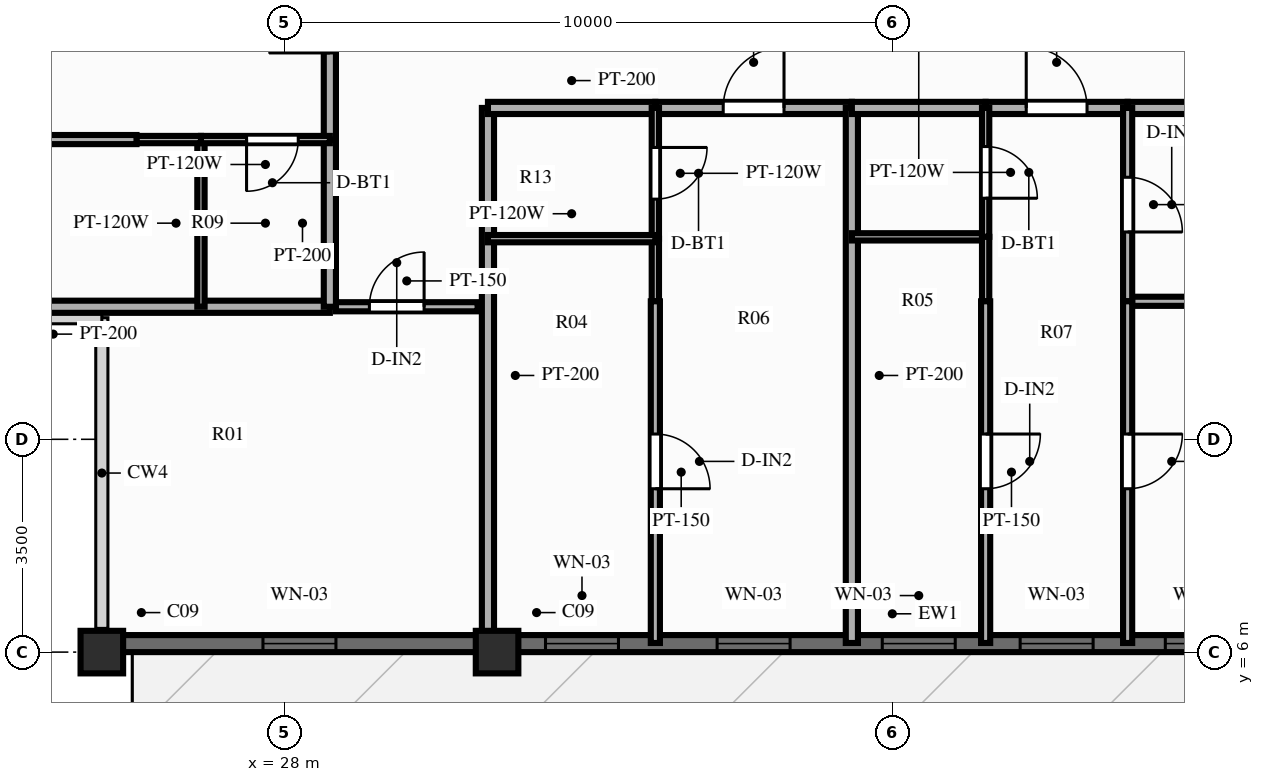
"""IFC4 building model, lengths in metres.
Left out: names, types, materials, properties, quantities, classifications, styles, units other than length and angle.
Written with IfcOpenShell. Run it as: python <this file> out.ifc"""

import sys

from ifc_helpers import new_model, si_unit, direction, frame, frame_2d, origin, origin_2d, place, context, subcontext, project, spatial, rectangle, extrude, source, transform, mapped, element, fill, save


model = new_model("IFC4")
c1 = context("Model", 3, precision=1e-05, world=origin(), true_north=direction((0.0, 1.0)))
c2 = subcontext(c1, "Body", "Model", "MODEL_VIEW")
j1 = project(units=[si_unit("LENGTHUNIT", "METRE"), si_unit("PLANEANGLEUNIT", "RADIAN")], contexts=[c1])
p1 = place(None, origin())
s1 = spatial("IfcSite", under=j1, at=p1, CompositionType="ELEMENT")
p2 = place(p1, origin())
s2 = spatial("IfcBuilding", under=s1, at=p2, CompositionType="ELEMENT")
p3 = place(p2, frame((0.0, 0.0, 216.3)))
s3 = spatial("IfcBuildingStorey", under=s2, at=p3, CompositionType="ELEMENT", Elevation=216.3)
m1 = source(origin(), c2, "Body", "SweptSolid", [
    extrude(rectangle(XDim=0.7, YDim=0.7, at=origin_2d()), origin(), (0.0, 0.0, 1.0), 3.9),
])
for number, where, z_axis, x_axis in (
    (1, (25.0, 6.0, 0.0), (0.0, 0.0, 1.0), (1.0, 0.0, 0.0)),
    (2, (31.5, 6.0, 0.0), (0.0, 0.0, 1.0), (1.0, 0.0, 0.0)),
):
    element("IfcColumn", number, at=place(p3, frame(where, z_axis=z_axis, x_axis=x_axis)), inside=s3, PredefinedType="COLUMN", context=c2, shape_type="MappedRepresentation", body=[
        mapped(m1, transform((0.0, 0.0, 0.0), scale=1.0)),
    ])
p4 = place(p3, frame((25.0, 6.14, 0.0), z_axis=(0.0, 0.0, 1.0), x_axis=(1.0, 0.0, 0.0)))
e3 = element("IfcWall", 3, at=p4, inside=s3, PredefinedType="SOLIDWALL", context=c2, shape_type="SweptSolid", body=[
    extrude(rectangle(XDim=26.0, YDim=0.28, at=frame_2d((13.0, 0.0))), origin(), (0.0, 0.0, 1.0), 2.44),
])
p5 = place(p4, frame((2.65, 0.0, 0.25)))
e4 = element("IfcOpeningElement", 4, at=p5, cuts=e3, PredefinedType="OPENING", context=c2, shape_type="SweptSolid", body=[
    extrude(rectangle(XDim=1.2, YDim=1.5, at=frame_2d((0.6, 0.75))), frame((0.0, 0.152, 0.0), z_axis=(0.0, -1.0, 0.0), x_axis=(1.0, 0.0, 0.0)), (0.0, 0.0, 1.0), 0.304),
])
p6 = place(p4, frame((7.296, 0.0, 0.25)))
e5 = element("IfcOpeningElement", 5, at=p6, cuts=e3, PredefinedType="OPENING", context=c2, shape_type="SweptSolid", body=[
    extrude(rectangle(XDim=1.2, YDim=1.5, at=frame_2d((0.6, 0.75))), frame((0.0, 0.152, 0.0), z_axis=(0.0, -1.0, 0.0), x_axis=(1.0, 0.0, 0.0)), (0.0, 0.0, 1.0), 0.304),
])
p7 = place(p4, frame((10.119, 0.0, 0.25)))
e6 = element("IfcOpeningElement", 6, at=p7, cuts=e3, PredefinedType="OPENING", context=c2, shape_type="SweptSolid", body=[
    extrude(rectangle(XDim=1.2, YDim=1.5, at=frame_2d((0.6, 0.75))), frame((0.0, 0.152, 0.0), z_axis=(0.0, -1.0, 0.0), x_axis=(1.0, 0.0, 0.0)), (0.0, 0.0, 1.0), 0.304),
])
p8 = place(p4, frame((12.835, 0.0, 0.25)))
e7 = element("IfcOpeningElement", 7, at=p8, cuts=e3, PredefinedType="OPENING", context=c2, shape_type="SweptSolid", body=[
    extrude(rectangle(XDim=1.2, YDim=1.5, at=frame_2d((0.6, 0.75))), frame((0.0, 0.152, 0.0), z_axis=(0.0, -1.0, 0.0), x_axis=(1.0, 0.0, 0.0)), (0.0, 0.0, 1.0), 0.304),
])
p9 = place(p4, frame((15.103, 0.0, 0.25)))
e8 = element("IfcOpeningElement", 8, at=p9, cuts=e3, PredefinedType="OPENING", context=c2, shape_type="SweptSolid", body=[
    extrude(rectangle(XDim=1.2, YDim=1.5, at=frame_2d((0.6, 0.75))), frame((0.0, 0.152, 0.0), z_axis=(0.0, -1.0, 0.0), x_axis=(1.0, 0.0, 0.0)), (0.0, 0.0, 1.0), 0.304),
])
p10 = place(p4, frame((17.49, 0.0, 0.25)))
e9 = element("IfcOpeningElement", 9, at=p10, cuts=e3, PredefinedType="OPENING", context=c2, shape_type="SweptSolid", body=[
    extrude(rectangle(XDim=1.2, YDim=1.5, at=frame_2d((0.6, 0.75))), frame((0.0, 0.152, 0.0), z_axis=(0.0, -1.0, 0.0), x_axis=(1.0, 0.0, 0.0)), (0.0, 0.0, 1.0), 0.304),
])
p11 = place(p4, frame((23.3, 0.0, 0.0), z_axis=(0.0, 0.0, 1.0), x_axis=(-1.0, 0.0, 0.0)))
e10 = element("IfcOpeningElement", 10, at=p11, cuts=e3, PredefinedType="OPENING", context=c2, shape_type="SweptSolid", body=[
    extrude(rectangle(XDim=1.1, YDim=2.15, at=frame_2d((0.55, 1.075))), frame((0.0, 0.152, 0.0), z_axis=(0.0, -1.0, 0.0), x_axis=(1.0, 0.0, 0.0)), (0.0, 0.0, 1.0), 0.304),
])
p12 = place(p3, frame((28.85, 11.68, 0.0), z_axis=(0.0, 0.0, 1.0), x_axis=(1.0, 0.0, 0.0)))
e11 = element("IfcWall", 11, at=p12, inside=s3, PredefinedType="PARTITIONING", context=c2, shape_type="SweptSolid", body=[
    extrude(rectangle(XDim=2.33, YDim=0.15, at=frame_2d((1.165, 0.0))), origin(), (0.0, 0.0, 1.0), 2.24),
])
p13 = place(p12, frame((0.55, 0.0, 0.0)))
e12 = element("IfcOpeningElement", 12, at=p13, cuts=e11, PredefinedType="OPENING", context=c2, shape_type="SweptSolid", body=[
    extrude(rectangle(XDim=0.9, YDim=2.1, at=frame_2d((0.45, 1.05))), frame((0.0, 0.087, 0.0), z_axis=(0.0, -1.0, 0.0), x_axis=(1.0, 0.0, 0.0)), (0.0, 0.0, 1.0), 0.174),
])
p14 = place(p3, frame((31.35, 14.95, 0.0), z_axis=(0.0, 0.0, 1.0), x_axis=(0.0, -1.0, 0.0)))
e13 = element("IfcWall", 13, at=p14, inside=s3, PredefinedType="PARTITIONING", context=c2, shape_type="SweptSolid", body=[
    extrude(rectangle(XDim=8.8, YDim=0.2, at=frame_2d((4.4, 0.0))), origin(), (0.0, 0.0, 1.0), 2.44),
])
p15 = place(p3, frame((31.35, 14.95, 0.0), z_axis=(0.0, 0.0, 1.0), x_axis=(1.0, 0.0, 0.0)))
e14 = element("IfcWall", 14, at=p15, inside=s3, PredefinedType="PARTITIONING", context=c2, shape_type="SweptSolid", body=[
    extrude(rectangle(XDim=2.753, YDim=0.2, at=frame_2d((1.376, 0.0))), origin(), (0.0, 0.0, 1.0), 3.56),
])
p16 = place(p3, frame((34.103, 14.95, 0.0), z_axis=(0.0, 0.0, 1.0), x_axis=(1.0, 0.0, 0.0)))
e15 = element("IfcWall", 15, at=p16, inside=s3, PredefinedType="PARTITIONING", context=c2, shape_type="SweptSolid", body=[
    extrude(rectangle(XDim=3.232, YDim=0.2, at=frame_2d((1.616, 0.0))), origin(), (0.0, 0.0, 1.0), 3.56),
])
p17 = place(p16, frame((1.116, 0.0, 0.0)))
e16 = element("IfcOpeningElement", 16, at=p17, cuts=e15, PredefinedType="OPENING", context=c2, shape_type="SweptSolid", body=[
    extrude(rectangle(XDim=1.0, YDim=2.15, at=frame_2d((0.5, 1.075))), frame((0.0, 0.112, 0.0), z_axis=(0.0, -1.0, 0.0), x_axis=(1.0, 0.0, 0.0)), (0.0, 0.0, 1.0), 0.224),
])
p18 = place(p3, frame((34.103, 14.95, 0.0), z_axis=(0.0, 0.0, 1.0), x_axis=(0.0, -1.0, 0.0)))
e17 = element("IfcWall", 17, at=p18, inside=s3, PredefinedType="PARTITIONING", context=c2, shape_type="SweptSolid", body=[
    extrude(rectangle(XDim=2.15, YDim=0.12, at=frame_2d((1.075, 0.0))), origin(), (0.0, 0.0, 1.0), 3.56),
])
p19 = place(p18, frame((0.65, 0.0, 0.0)))
e18 = element("IfcOpeningElement", 18, at=p19, cuts=e17, PredefinedType="OPENING", context=c2, shape_type="SweptSolid", body=[
    extrude(rectangle(XDim=0.85, YDim=2.05, at=frame_2d((0.425, 1.025))), frame((0.0, 0.072, 0.0), z_axis=(0.0, -1.0, 0.0), x_axis=(1.0, 0.0, 0.0)), (0.0, 0.0, 1.0), 0.144),
])
p20 = place(p3, frame((34.103, 12.8, 0.0), z_axis=(0.0, 0.0, 1.0), x_axis=(0.0, -1.0, 0.0)))
e19 = element("IfcWall", 19, at=p20, inside=s3, PredefinedType="PARTITIONING", context=c2, shape_type="SweptSolid", body=[
    extrude(rectangle(XDim=1.03, YDim=0.12, at=frame_2d((0.515, 0.0))), origin(), (0.0, 0.0, 1.0), 3.56),
])
p21 = place(p3, frame((31.35, 12.8, 0.0), z_axis=(0.0, 0.0, 1.0), x_axis=(1.0, 0.0, 0.0)))
e20 = element("IfcWall", 20, at=p21, inside=s3, PredefinedType="PARTITIONING", context=c2, shape_type="SweptSolid", body=[
    extrude(rectangle(XDim=2.753, YDim=0.12, at=frame_2d((1.376, 0.0))), origin(), (0.0, 0.0, 1.0), 3.56),
])
p22 = place(p3, frame((34.103, 11.77, 0.0), z_axis=(0.0, 0.0, 1.0), x_axis=(0.0, -1.0, 0.0)))
e21 = element("IfcWall", 21, at=p22, inside=s3, PredefinedType="PARTITIONING", context=c2, shape_type="SweptSolid", body=[
    extrude(rectangle(XDim=5.62, YDim=0.15, at=frame_2d((2.81, 0.0))), origin(), (0.0, 0.0, 1.0), 3.56),
])
p23 = place(p22, frame((2.183, 0.0, 0.0)))
e22 = element("IfcOpeningElement", 22, at=p23, cuts=e21, PredefinedType="OPENING", context=c2, shape_type="SweptSolid", body=[
    extrude(rectangle(XDim=0.9, YDim=2.1, at=frame_2d((0.45, 1.05))), frame((0.0, 0.087, 0.0), z_axis=(0.0, -1.0, 0.0), x_axis=(1.0, 0.0, 0.0)), (0.0, 0.0, 1.0), 0.174),
])
p24 = place(p3, frame((37.335, 14.95, 0.0), z_axis=(0.0, 0.0, 1.0), x_axis=(0.0, -1.0, 0.0)))
e23 = element("IfcWall", 23, at=p24, inside=s3, PredefinedType="PARTITIONING", context=c2, shape_type="SweptSolid", body=[
    extrude(rectangle(XDim=8.8, YDim=0.2, at=frame_2d((4.4, 0.0))), origin(), (0.0, 0.0, 1.0), 3.56),
])
p25 = place(p3, frame((37.335, 14.95, 0.0), z_axis=(0.0, 0.0, 1.0), x_axis=(1.0, 0.0, 0.0)))
e24 = element("IfcWall", 24, at=p25, inside=s3, PredefinedType="PARTITIONING", context=c2, shape_type="SweptSolid", body=[
    extrude(rectangle(XDim=2.2, YDim=0.2, at=frame_2d((1.1, 0.0))), origin(), (0.0, 0.0, 1.0), 3.56),
])
p26 = place(p3, frame((39.535, 14.95, 0.0), z_axis=(0.0, 0.0, 1.0), x_axis=(1.0, 0.0, 0.0)))
e25 = element("IfcWall", 25, at=p26, inside=s3, PredefinedType="PARTITIONING", context=c2, shape_type="SweptSolid", body=[
    extrude(rectangle(XDim=2.335, YDim=0.2, at=frame_2d((1.168, 0.0))), origin(), (0.0, 0.0, 1.0), 3.56),
])
p27 = place(p26, frame((0.668, 0.0, 0.0)))
e26 = element("IfcOpeningElement", 26, at=p27, cuts=e25, PredefinedType="OPENING", context=c2, shape_type="SweptSolid", body=[
    extrude(rectangle(XDim=1.0, YDim=2.15, at=frame_2d((0.5, 1.075))), frame((0.0, 0.112, 0.0), z_axis=(0.0, -1.0, 0.0), x_axis=(1.0, 0.0, 0.0)), (0.0, 0.0, 1.0), 0.224),
])
p28 = place(p3, frame((41.87, 14.95, 0.0), z_axis=(0.0, 0.0, 1.0), x_axis=(1.0, 0.0, 0.0)))
e27 = element("IfcWall", 27, at=p28, inside=s3, PredefinedType="PARTITIONING", context=c2, shape_type="SweptSolid", body=[
    extrude(rectangle(XDim=2.78, YDim=0.2, at=frame_2d((1.39, 0.0))), origin(), (0.0, 0.0, 1.0), 3.56),
])
p29 = place(p3, frame((37.335, 12.83, 0.0), z_axis=(0.0, 0.0, 1.0), x_axis=(1.0, 0.0, 0.0)))
e28 = element("IfcWall", 28, at=p29, inside=s3, PredefinedType="PARTITIONING", context=c2, shape_type="SweptSolid", body=[
    extrude(rectangle(XDim=2.2, YDim=0.12, at=frame_2d((1.1, 0.0))), origin(), (0.0, 0.0, 1.0), 3.56),
])
p30 = place(p3, frame((41.87, 11.77, 0.0), z_axis=(0.0, 0.0, 1.0), x_axis=(1.0, 0.0, 0.0)))
e29 = element("IfcWall", 29, at=p30, inside=s3, PredefinedType="PARTITIONING", context=c2, shape_type="SweptSolid", body=[
    extrude(rectangle(XDim=2.78, YDim=0.15, at=frame_2d((1.39, 0.0))), origin(), (0.0, 0.0, 1.0), 3.39),
])
p31 = place(p3, frame((39.535, 14.95, 0.0), z_axis=(0.0, 0.0, 1.0), x_axis=(0.0, -1.0, 0.0)))
e30 = element("IfcWall", 30, at=p31, inside=s3, PredefinedType="PARTITIONING", context=c2, shape_type="SweptSolid", body=[
    extrude(rectangle(XDim=2.12, YDim=0.12, at=frame_2d((1.06, 0.0))), origin(), (0.0, 0.0, 1.0), 3.56),
])
p32 = place(p31, frame((0.635, 0.0, 0.0)))
e31 = element("IfcOpeningElement", 31, at=p32, cuts=e30, PredefinedType="OPENING", context=c2, shape_type="SweptSolid", body=[
    extrude(rectangle(XDim=0.85, YDim=2.05, at=frame_2d((0.425, 1.025))), frame((0.0, 0.072, 0.0), z_axis=(0.0, -1.0, 0.0), x_axis=(1.0, 0.0, 0.0)), (0.0, 0.0, 1.0), 0.144),
])
p33 = place(p3, frame((39.535, 12.83, 0.0), z_axis=(0.0, 0.0, 1.0), x_axis=(0.0, -1.0, 0.0)))
e32 = element("IfcWall", 32, at=p33, inside=s3, PredefinedType="PARTITIONING", context=c2, shape_type="SweptSolid", body=[
    extrude(rectangle(XDim=1.06, YDim=0.12, at=frame_2d((0.53, 0.0))), origin(), (0.0, 0.0, 1.0), 3.56),
])
p34 = place(p3, frame((39.535, 11.77, 0.0), z_axis=(0.0, 0.0, 1.0), x_axis=(0.0, -1.0, 0.0)))
e33 = element("IfcWall", 33, at=p34, inside=s3, PredefinedType="PARTITIONING", context=c2, shape_type="SweptSolid", body=[
    extrude(rectangle(XDim=5.62, YDim=0.15, at=frame_2d((2.81, 0.0))), origin(), (0.0, 0.0, 1.0), 3.56),
])
p35 = place(p34, frame((2.183, 0.0, 0.0)))
e34 = element("IfcOpeningElement", 34, at=p35, cuts=e33, PredefinedType="OPENING", context=c2, shape_type="SweptSolid", body=[
    extrude(rectangle(XDim=0.9, YDim=2.1, at=frame_2d((0.45, 1.05))), frame((0.0, 0.087, 0.0), z_axis=(0.0, -1.0, 0.0), x_axis=(1.0, 0.0, 0.0)), (0.0, 0.0, 1.0), 0.174),
])
p36 = place(p3, frame((41.87, 14.95, 0.0), z_axis=(0.0, 0.0, 1.0), x_axis=(0.0, -1.0, 0.0)))
e35 = element("IfcWall", 35, at=p36, inside=s3, PredefinedType="PARTITIONING", context=c2, shape_type="SweptSolid", body=[
    extrude(rectangle(XDim=3.18, YDim=0.15, at=frame_2d((1.59, 0.0))), origin(), (0.0, 0.0, 1.0), 3.56),
])
p37 = place(p36, frame((1.14, 0.0, 0.0)))
e36 = element("IfcOpeningElement", 36, at=p37, cuts=e35, PredefinedType="OPENING", context=c2, shape_type="SweptSolid", body=[
    extrude(rectangle(XDim=0.9, YDim=2.1, at=frame_2d((0.45, 1.05))), frame((0.0, 0.087, 0.0), z_axis=(0.0, -1.0, 0.0), x_axis=(1.0, 0.0, 0.0)), (0.0, 0.0, 1.0), 0.174),
])
p38 = place(p3, frame((41.87, 11.77, 0.0), z_axis=(0.0, 0.0, 1.0), x_axis=(0.0, -1.0, 0.0)))
e37 = element("IfcWall", 37, at=p38, inside=s3, PredefinedType="PARTITIONING", context=c2, shape_type="SweptSolid", body=[
    extrude(rectangle(XDim=5.62, YDim=0.15, at=frame_2d((2.81, 0.0))), origin(), (0.0, 0.0, 1.0), 3.56),
])
p39 = place(p38, frame((2.183, 0.0, 0.0)))
e38 = element("IfcOpeningElement", 38, at=p39, cuts=e37, PredefinedType="OPENING", context=c2, shape_type="SweptSolid", body=[
    extrude(rectangle(XDim=0.9, YDim=2.1, at=frame_2d((0.45, 1.05))), frame((0.0, 0.087, 0.0), z_axis=(0.0, -1.0, 0.0), x_axis=(1.0, 0.0, 0.0)), (0.0, 0.0, 1.0), 0.174),
])
p40 = place(p3, frame((28.75, 11.68, 0.0), z_axis=(0.0, 0.0, 1.0), x_axis=(-1.0, 0.0, 0.0)))
e39 = element("IfcWall", 39, at=p40, inside=s3, PredefinedType="PARTITIONING", context=c2, shape_type="SweptSolid", body=[
    extrude(rectangle(XDim=9.1, YDim=0.2, at=frame_2d((4.55, 0.0))), origin(), (0.0, 0.0, 1.0), 2.24),
])
p41 = place(p3, frame((28.75, 11.68, 0.0), z_axis=(0.0, 0.0, 1.0), x_axis=(0.0, 1.0, 0.0)))
e40 = element("IfcWall", 40, at=p41, inside=s3, PredefinedType="PARTITIONING", context=c2, shape_type="SweptSolid", body=[
    extrude(rectangle(XDim=2.75, YDim=0.2, at=frame_2d((1.375, 0.0))), origin(), (0.0, 0.0, 1.0), 3.56),
])
p42 = place(p3, frame((28.75, 14.43, 0.0), z_axis=(0.0, 0.0, 1.0), x_axis=(0.0, 1.0, 0.0)))
e41 = element("IfcWall", 41, at=p42, inside=s3, PredefinedType="PARTITIONING", context=c2, shape_type="SweptSolid", body=[
    extrude(rectangle(XDim=3.85, YDim=0.2, at=frame_2d((1.925, 0.0))), origin(), (0.0, 0.0, 1.0), 3.56),
])
p43 = place(p42, frame((1.425, 0.0, 0.0)))
e42 = element("IfcOpeningElement", 42, at=p43, cuts=e41, PredefinedType="OPENING", context=c2, shape_type="SweptSolid", body=[
    extrude(rectangle(XDim=1.0, YDim=2.15, at=frame_2d((0.5, 1.075))), frame((0.0, 0.112, 0.0), z_axis=(0.0, -1.0, 0.0), x_axis=(1.0, 0.0, 0.0)), (0.0, 0.0, 1.0), 0.224),
])
p44 = place(p3, frame((26.63, 11.68, 0.0), z_axis=(0.0, 0.0, 1.0), x_axis=(0.0, 1.0, 0.0)))
e43 = element("IfcWall", 43, at=p44, inside=s3, PredefinedType="PARTITIONING", context=c2, shape_type="SweptSolid", body=[
    extrude(rectangle(XDim=2.75, YDim=0.12, at=frame_2d((1.375, 0.0))), origin(), (0.0, 0.0, 1.0), 2.24),
])
p45 = place(p3, frame((28.75, 14.43, 0.0), z_axis=(0.0, 0.0, 1.0), x_axis=(-1.0, 0.0, 0.0)))
e44 = element("IfcWall", 44, at=p45, inside=s3, PredefinedType="PARTITIONING", context=c2, shape_type="SweptSolid", body=[
    extrude(rectangle(XDim=2.12, YDim=0.12, at=frame_2d((1.06, 0.0))), origin(), (0.0, 0.0, 1.0), 3.56),
])
p46 = place(p45, frame((0.52, 0.0, 0.0)))
e45 = element("IfcOpeningElement", 45, at=p46, cuts=e44, PredefinedType="OPENING", context=c2, shape_type="SweptSolid", body=[
    extrude(rectangle(XDim=0.85, YDim=2.05, at=frame_2d((0.425, 1.025))), frame((0.0, 0.072, 0.0), z_axis=(0.0, -1.0, 0.0), x_axis=(1.0, 0.0, 0.0)), (0.0, 0.0, 1.0), 0.144),
])
p47 = place(p3, frame((26.63, 14.43, 0.0), z_axis=(0.0, 0.0, 1.0), x_axis=(-1.0, 0.0, 0.0)))
e46 = element("IfcWall", 46, at=p47, inside=s3, PredefinedType="PARTITIONING", context=c2, shape_type="SweptSolid", body=[
    extrude(rectangle(XDim=1.06, YDim=0.12, at=frame_2d((0.53, 0.0))), origin(), (0.0, 0.0, 1.0), 3.56),
])
p48 = place(p3, frame((25.57, 14.43, 0.0), z_axis=(0.0, 0.0, 1.0), x_axis=(-1.0, 0.0, 0.0)))
e47 = element("IfcWall", 47, at=p48, inside=s3, PredefinedType="PARTITIONING", context=c2, shape_type="SweptSolid", body=[
    extrude(rectangle(XDim=5.92, YDim=0.15, at=frame_2d((2.96, 0.0))), origin(), (0.0, 0.0, 1.0), 3.56),
])
p49 = place(p48, frame((2.321, 0.0, 0.0)))
e48 = element("IfcOpeningElement", 48, at=p49, cuts=e47, PredefinedType="OPENING", context=c2, shape_type="SweptSolid", body=[
    extrude(rectangle(XDim=0.9, YDim=2.1, at=frame_2d((0.45, 1.05))), frame((0.0, 0.087, 0.0), z_axis=(0.0, -1.0, 0.0), x_axis=(1.0, 0.0, 0.0)), (0.0, 0.0, 1.0), 0.174),
])
m2 = source(origin(), c2, "Body", "SweptSolid", [
    extrude(rectangle(XDim=1.2, YDim=1.5, at=frame_2d((0.6, 0.75))), frame((0.0, 0.03, 0.0), z_axis=(0.0, -1.0, 0.0), x_axis=(1.0, 0.0, 0.0)), (0.0, 0.0, 1.0), 0.06),
])
p50 = place(p5, origin())
e49 = element("IfcWindow", 49, at=p50, inside=s3, PartitioningType="SINGLE_PANEL", PredefinedType="WINDOW", context=c2, shape_type="MappedRepresentation", body=[
    mapped(m2, transform((0.0, 0.0, 0.0), scale=1.0)),
])
fill(e4, e49)
p51 = place(p6, origin())
e50 = element("IfcWindow", 50, at=p51, inside=s3, PartitioningType="SINGLE_PANEL", PredefinedType="WINDOW", context=c2, shape_type="MappedRepresentation", body=[
    mapped(m2, transform((0.0, 0.0, 0.0), scale=1.0)),
])
fill(e5, e50)
p52 = place(p7, origin())
e51 = element("IfcWindow", 51, at=p52, inside=s3, PartitioningType="SINGLE_PANEL", PredefinedType="WINDOW", context=c2, shape_type="MappedRepresentation", body=[
    mapped(m2, transform((0.0, 0.0, 0.0), scale=1.0)),
])
fill(e6, e51)
p53 = place(p8, origin())
e52 = element("IfcWindow", 52, at=p53, inside=s3, PartitioningType="SINGLE_PANEL", PredefinedType="WINDOW", context=c2, shape_type="MappedRepresentation", body=[
    mapped(m2, transform((0.0, 0.0, 0.0), scale=1.0)),
])
fill(e7, e52)
p54 = place(p9, origin())
e53 = element("IfcWindow", 53, at=p54, inside=s3, PartitioningType="SINGLE_PANEL", PredefinedType="WINDOW", context=c2, shape_type="MappedRepresentation", body=[
    mapped(m2, transform((0.0, 0.0, 0.0), scale=1.0)),
])
fill(e8, e53)
p55 = place(p10, origin())
e54 = element("IfcWindow", 54, at=p55, inside=s3, PartitioningType="SINGLE_PANEL", PredefinedType="WINDOW", context=c2, shape_type="MappedRepresentation", body=[
    mapped(m2, transform((0.0, 0.0, 0.0), scale=1.0)),
])
fill(e9, e54)
m3 = source(origin(), c2, "Body", "SweptSolid", [
    extrude(rectangle(XDim=0.9, YDim=2.1, at=frame_2d((0.45, 1.05))), frame((0.0, 0.025, 0.0), z_axis=(0.0, -1.0, 0.0), x_axis=(1.0, 0.0, 0.0)), (0.0, 0.0, 1.0), 0.05),
])
p56 = place(p13, origin())
e55 = element("IfcDoor", 55, at=p56, inside=s3, OperationType="SINGLE_SWING_RIGHT", PredefinedType="DOOR", context=c2, shape_type="MappedRepresentation", body=[
    mapped(m3, transform((0.0, 0.0, 0.0), scale=1.0)),
])
fill(e12, e55)
m4 = source(origin(), c2, "Body", "SweptSolid", [
    extrude(rectangle(XDim=1.0, YDim=2.15, at=frame_2d((0.5, 1.075))), frame((0.0, 0.025, 0.0), z_axis=(0.0, -1.0, 0.0), x_axis=(1.0, 0.0, 0.0)), (0.0, 0.0, 1.0), 0.05),
])
p57 = place(p17, origin())
e56 = element("IfcDoor", 56, at=p57, inside=s3, OperationType="SINGLE_SWING_RIGHT", PredefinedType="DOOR", context=c2, shape_type="MappedRepresentation", body=[
    mapped(m4, transform((0.0, 0.0, 0.0), scale=1.0)),
])
fill(e16, e56)
m5 = source(origin(), c2, "Body", "SweptSolid", [
    extrude(rectangle(XDim=0.85, YDim=2.05, at=frame_2d((0.425, 1.025))), frame((0.0, 0.025, 0.0), z_axis=(0.0, -1.0, 0.0), x_axis=(1.0, 0.0, 0.0)), (0.0, 0.0, 1.0), 0.05),
])
p58 = place(p19, origin())
e57 = element("IfcDoor", 57, at=p58, inside=s3, OperationType="SINGLE_SWING_LEFT", PredefinedType="DOOR", context=c2, shape_type="MappedRepresentation", body=[
    mapped(m5, transform((0.0, 0.0, 0.0), scale=1.0)),
])
fill(e18, e57)
p59 = place(p23, origin())
e58 = element("IfcDoor", 58, at=p59, inside=s3, OperationType="SINGLE_SWING_RIGHT", PredefinedType="DOOR", context=c2, shape_type="MappedRepresentation", body=[
    mapped(m3, transform((0.0, 0.0, 0.0), scale=1.0)),
])
fill(e22, e58)
p60 = place(p27, origin())
e59 = element("IfcDoor", 59, at=p60, inside=s3, OperationType="SINGLE_SWING_LEFT", PredefinedType="DOOR", context=c2, shape_type="MappedRepresentation", body=[
    mapped(m4, transform((0.0, 0.0, 0.0), scale=1.0)),
])
fill(e26, e59)
p61 = place(p32, origin())
e60 = element("IfcDoor", 60, at=p61, inside=s3, OperationType="SINGLE_SWING_RIGHT", PredefinedType="DOOR", context=c2, shape_type="MappedRepresentation", body=[
    mapped(m5, transform((0.0, 0.0, 0.0), scale=1.0)),
])
fill(e31, e60)
p62 = place(p35, origin())
e61 = element("IfcDoor", 61, at=p62, inside=s3, OperationType="SINGLE_SWING_LEFT", PredefinedType="DOOR", context=c2, shape_type="MappedRepresentation", body=[
    mapped(m3, transform((0.0, 0.0, 0.0), scale=1.0)),
])
fill(e34, e61)
p63 = place(p37, origin())
e62 = element("IfcDoor", 62, at=p63, inside=s3, OperationType="SINGLE_SWING_RIGHT", PredefinedType="DOOR", context=c2, shape_type="MappedRepresentation", body=[
    mapped(m3, transform((0.0, 0.0, 0.0), scale=1.0)),
])
fill(e36, e62)
p64 = place(p39, origin())
e63 = element("IfcDoor", 63, at=p64, inside=s3, OperationType="SINGLE_SWING_LEFT", PredefinedType="DOOR", context=c2, shape_type="MappedRepresentation", body=[
    mapped(m3, transform((0.0, 0.0, 0.0), scale=1.0)),
])
fill(e38, e63)
p65 = place(p43, origin())
e64 = element("IfcDoor", 64, at=p65, inside=s3, OperationType="SINGLE_SWING_LEFT", PredefinedType="DOOR", context=c2, shape_type="MappedRepresentation", body=[
    mapped(m4, transform((0.0, 0.0, 0.0), scale=1.0)),
])
fill(e42, e64)
p66 = place(p46, origin())
e65 = element("IfcDoor", 65, at=p66, inside=s3, OperationType="SINGLE_SWING_RIGHT", PredefinedType="DOOR", context=c2, shape_type="MappedRepresentation", body=[
    mapped(m5, transform((0.0, 0.0, 0.0), scale=1.0)),
])
fill(e45, e65)
save(model, sys.argv[1])
